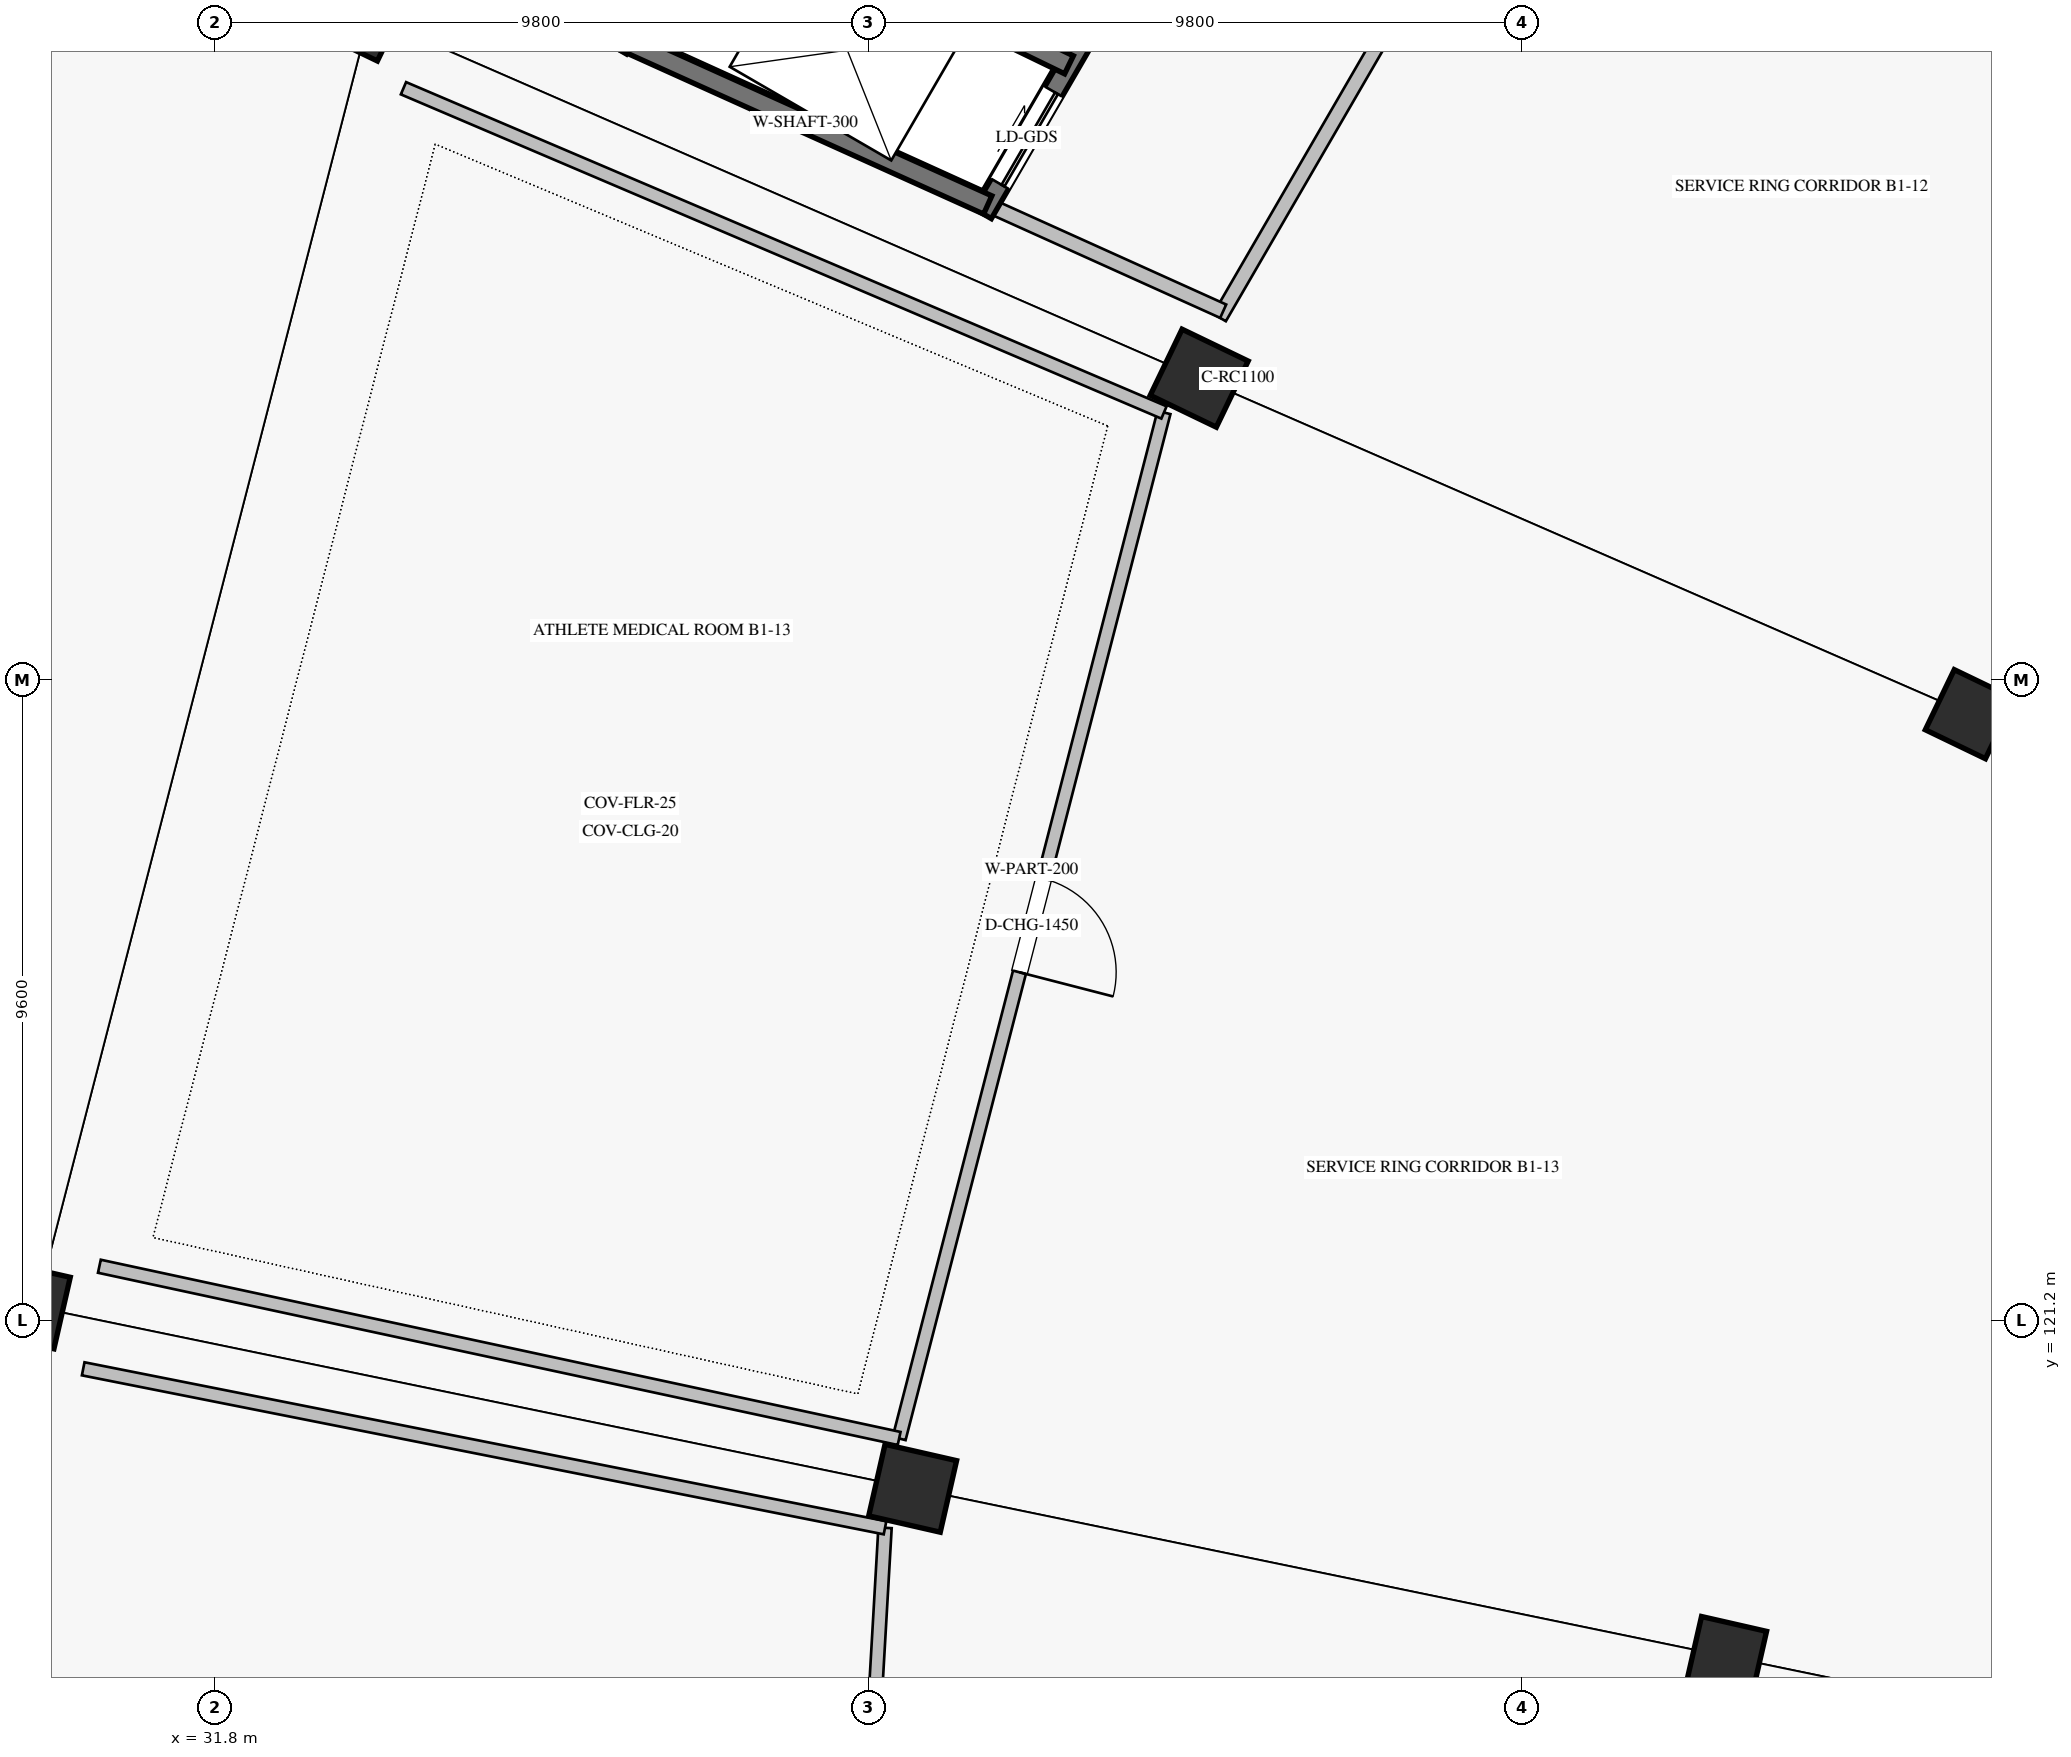
"""IFC4 building model, lengths in metres.
Left out: names, types, materials, properties, quantities, classifications, styles, units other than length and angle.
Written with IfcOpenShell. Run it as: python <this file> out.ifc"""

import sys

from ifc_helpers import new_model, si_unit, direction, frame, frame_2d, origin, origin_2d, place, context, subcontext, project, spatial, rectangle, extrude, element, fill, save


model = new_model("IFC4")
c1 = context("Model", 3, precision=1e-05, world=origin(), true_north=direction((0.0, 1.0)))
c2 = subcontext(c1, "Body", "Model", "MODEL_VIEW")
j1 = project(units=[si_unit("LENGTHUNIT", "METRE"), si_unit("PLANEANGLEUNIT", "RADIAN")], contexts=[c1])
p1 = place(None, origin())
s1 = spatial("IfcSite", under=j1, at=p1, CompositionType="ELEMENT")
p2 = place(p1, origin())
s2 = spatial("IfcBuilding", under=s1, at=p2, CompositionType="ELEMENT")
p3 = place(p2, frame((0.0, 0.0, -5.44)))
s3 = spatial("IfcBuildingStorey", under=s2, at=p3, CompositionType="ELEMENT", Elevation=-5.44)
for number, where, z_axis, x_axis in (
    (1, (58.114, 130.287, 0.0), (0.0, 0.0, 1.0), (-0.901, 0.434, 0.0)),
    (2, (54.467, 116.16, 0.0), (0.0, 0.0, 1.0), (-0.975, 0.223, 0.0)),
):
    element("IfcColumn", number, at=place(p3, frame(where, z_axis=z_axis, x_axis=x_axis)), inside=s3, PredefinedType="COLUMN", context=c2, shape_type="SweptSolid", body=[
        extrude(rectangle(XDim=1.0, YDim=1.0, at=origin_2d()), origin(), (0.0, 0.0, 1.0), 5.44),
    ])
for number, where, z_axis, x_axis in (
    (3, (46.559, 135.325, 0.0), (0.0, 0.0, 1.0), (-0.901, 0.434, 0.0)),
    (4, (42.262, 118.682, 0.0), (0.0, 0.0, 1.0), (-0.975, 0.223, 0.0)),
):
    element("IfcColumn", number, at=place(p3, frame(where, z_axis=z_axis, x_axis=x_axis)), inside=s3, PredefinedType="COLUMN", context=c2, shape_type="SweptSolid", body=[
        extrude(rectangle(XDim=1.1, YDim=1.1, at=origin_2d()), origin(), (0.0, 0.0, 1.0), 5.44),
    ])
for number, where, z_axis, x_axis in (
    (5, (34.115, 140.75, 0.0), (0.0, 0.0, 1.0), (-0.901, 0.434, 0.0)),
    (6, (29.119, 121.398, 0.0), (0.0, 0.0, 1.0), (-0.975, 0.223, 0.0)),
):
    element("IfcColumn", number, at=place(p3, frame(where, z_axis=z_axis, x_axis=x_axis)), inside=s3, PredefinedType="COLUMN", context=c2, shape_type="SweptSolid", body=[
        extrude(rectangle(XDim=0.8, YDim=1.1, at=origin_2d()), origin(), (0.0, 0.0, 1.0), 5.44),
    ])
p4 = place(p3, frame((45.9, 142.254, 0.0), z_axis=(0.0, 0.0, 1.0), x_axis=(-0.501629534056, -0.86508254552, 0.0)))
e7 = element("IfcWall", 7, at=p4, inside=s3, PredefinedType="SHEAR", context=c2, shape_type="SweptSolid", body=[
    extrude(rectangle(XDim=5.157, YDim=0.3, at=frame_2d((2.579, 0.0))), origin(), (0.0, 0.0, 1.0), 5.14),
])
p5 = place(p4, frame((0.766, 0.0, 0.0)))
e8 = element("IfcOpeningElement", 8, at=p5, cuts=e7, PredefinedType="OPENING", context=c2, shape_type="SweptSolid", body=[
    extrude(rectangle(XDim=1.1, YDim=2.2, at=frame_2d((0.55, 1.1))), frame((0.0, 0.16, 0.0), z_axis=(0.0, -1.0, 0.0), x_axis=(1.0, 0.0, 0.0)), (0.0, 0.0, 1.0), 0.32),
])
p6 = place(p4, frame((3.042, 0.0, 0.0)))
e9 = element("IfcOpeningElement", 9, at=p6, cuts=e7, PredefinedType="OPENING", context=c2, shape_type="SweptSolid", body=[
    extrude(rectangle(XDim=1.6, YDim=2.3, at=frame_2d((0.8, 1.15))), frame((0.0, 0.16, 0.0), z_axis=(0.0, -1.0, 0.0), x_axis=(1.0, 0.0, 0.0)), (0.0, 0.0, 1.0), 0.32),
])
p7 = place(p3, frame((40.595, 145.012, 0.0), z_axis=(0.0, 0.0, 1.0), x_axis=(-0.501630260479, -0.865082124293, 0.0)))
e10 = element("IfcWall", 10, at=p7, inside=s3, PredefinedType="SHEAR", context=c2, shape_type="SweptSolid", body=[
    extrude(rectangle(XDim=5.491, YDim=0.3, at=frame_2d((2.746, 0.0))), origin(), (0.0, 0.0, 1.0), 5.14),
])
p8 = place(p3, frame((43.388, 137.922, 0.0), z_axis=(0.0, 0.0, 1.0), x_axis=(-0.911521602376, 0.41125219562, 0.0)))
e11 = element("IfcWall", 11, at=p8, inside=s3, PredefinedType="SHEAR", context=c2, shape_type="SweptSolid", body=[
    extrude(rectangle(XDim=6.004, YDim=0.3, at=frame_2d((3.002, 0.0))), origin(), (0.0, 0.0, 1.0), 5.14),
])
p9 = place(p3, frame((44.606, 140.023, 0.0), z_axis=(0.0, 0.0, 1.0), x_axis=(-0.899759302591, 0.436386522936, 0.0)))
e12 = element("IfcWall", 12, at=p9, inside=s3, PredefinedType="SHEAR", context=c2, shape_type="SweptSolid", body=[
    extrude(rectangle(XDim=5.989, YDim=0.3, at=frame_2d((2.995, 0.0))), origin(), (0.0, 0.0, 1.0), 5.14),
])
p10 = place(p3, frame((54.944, 150.17, 0.0), z_axis=(0.0, 0.0, 1.0), x_axis=(-0.501612626242, -0.865092349518, 0.0)))
e13 = element("IfcWall", 13, at=p10, inside=s3, PredefinedType="SOLIDWALL", context=c2, shape_type="SweptSolid", body=[
    extrude(rectangle(XDim=16.11, YDim=0.22, at=frame_2d((8.055, 0.0))), origin(), (0.0, 0.0, 1.0), 4.088),
])
p11 = place(p10, frame((6.511, 0.0, 0.0)))
e14 = element("IfcOpeningElement", 14, at=p11, cuts=e13, PredefinedType="OPENING", context=c2, shape_type="SweptSolid", body=[
    extrude(rectangle(XDim=1.5, YDim=2.2, at=frame_2d((0.75, 1.1))), frame((0.0, 0.12, 0.0), z_axis=(0.0, -1.0, 0.0), x_axis=(1.0, 0.0, 0.0)), (0.0, 0.0, 1.0), 0.24),
])
p12 = place(p3, frame((46.918, 136.329, 0.0), z_axis=(0.0, 0.0, 1.0), x_axis=(-0.91149641055, 0.411308027582, 0.0)))
e15 = element("IfcWall", 15, at=p12, inside=s3, PredefinedType="SOLIDWALL", context=c2, shape_type="SweptSolid", body=[
    extrude(rectangle(XDim=3.873, YDim=0.22, at=frame_2d((1.937, 0.0))), origin(), (0.0, 0.0, 1.0), 5.14),
])
p13 = place(p3, frame((46.031, 134.811, 0.0), z_axis=(0.0, 0.0, 1.0), x_axis=(-0.249970043824, -0.968253570709, 0.0)))
e16 = element("IfcWall", 16, at=p13, inside=s3, PredefinedType="PARTITIONING", context=c2, shape_type="SweptSolid", body=[
    extrude(rectangle(XDim=15.887, YDim=0.2, at=frame_2d((7.943, 0.0))), origin(), (0.0, 0.0, 1.0), 4.46),
])
p14 = place(p13, frame((7.218, 0.0, 0.0)))
e17 = element("IfcOpeningElement", 17, at=p14, cuts=e16, PredefinedType="OPENING", context=c2, shape_type="SweptSolid", body=[
    extrude(rectangle(XDim=1.45, YDim=2.2, at=frame_2d((0.725, 1.1))), frame((0.0, 0.11, 0.0), z_axis=(0.0, -1.0, 0.0), x_axis=(1.0, 0.0, 0.0)), (0.0, 0.0, 1.0), 0.22),
])
p15 = place(p3, frame((46.031, 134.811, 0.0), z_axis=(0.0, 0.0, 1.0), x_axis=(-0.919905328402, 0.392140519173, 0.0)))
e18 = element("IfcWall", 18, at=p15, inside=s3, PredefinedType="PARTITIONING", context=c2, shape_type="SweptSolid", body=[
    extrude(rectangle(XDim=12.396, YDim=0.2, at=frame_2d((6.198, 0.0))), origin(), (0.0, 0.0, 1.0), 4.46),
])
p16 = place(p3, frame((42.06, 119.428, 0.0), z_axis=(0.0, 0.0, 1.0), x_axis=(-0.97759337709, 0.210502230558, 0.0)))
e19 = element("IfcWall", 19, at=p16, inside=s3, PredefinedType="PARTITIONING", context=c2, shape_type="SweptSolid", body=[
    extrude(rectangle(XDim=12.266, YDim=0.2, at=frame_2d((6.133, 0.0))), origin(), (0.0, 0.0, 1.0), 4.46),
])
p17 = place(p3, frame((41.848, 118.089, 0.0), z_axis=(0.0, 0.0, 1.0), x_axis=(-0.057603503798, -0.998339539611, 0.0)))
e20 = element("IfcWall", 20, at=p17, inside=s3, PredefinedType="PARTITIONING", context=c2, shape_type="SweptSolid", body=[
    extrude(rectangle(XDim=15.444, YDim=0.2, at=frame_2d((7.722, 0.0))), origin(), (0.0, 0.0, 1.0), 4.46),
])
p18 = place(p17, frame((7.232, 0.0, 0.0)))
e21 = element("IfcOpeningElement", 21, at=p18, cuts=e20, PredefinedType="OPENING", context=c2, shape_type="SweptSolid", body=[
    extrude(rectangle(XDim=0.98, YDim=2.15, at=frame_2d((0.49, 1.075))), frame((0.0, 0.11, 0.0), z_axis=(0.0, -1.0, 0.0), x_axis=(1.0, 0.0, 0.0)), (0.0, 0.0, 1.0), 0.22),
])
p19 = place(p3, frame((41.848, 118.089, 0.0), z_axis=(0.0, 0.0, 1.0), x_axis=(-0.980904167784, 0.194491680088, 0.0)))
e22 = element("IfcWall", 22, at=p19, inside=s3, PredefinedType="PARTITIONING", context=c2, shape_type="SweptSolid", body=[
    extrude(rectangle(XDim=12.257, YDim=0.2, at=frame_2d((6.128, 0.0))), origin(), (0.0, 0.0, 1.0), 4.46),
])
p20 = place(p6, origin())
e23 = element("IfcDoor", 23, at=p20, inside=s3, OperationType="SLIDING_TO_LEFT", PredefinedType="DOOR", context=c2, shape_type="SweptSolid", body=[
    extrude(rectangle(XDim=1.6, YDim=2.3, at=frame_2d((0.8, 1.15))), frame((0.0, 0.025, 0.0), z_axis=(0.0, -1.0, 0.0), x_axis=(1.0, 0.0, 0.0)), (0.0, 0.0, 1.0), 0.05),
])
fill(e9, e23)
p21 = place(p14, origin())
e24 = element("IfcDoor", 24, at=p21, inside=s3, OperationType="SINGLE_SWING_RIGHT", PredefinedType="DOOR", context=c2, shape_type="SweptSolid", body=[
    extrude(rectangle(XDim=1.45, YDim=2.2, at=frame_2d((0.725, 1.1))), frame((0.0, 0.025, 0.0), z_axis=(0.0, -1.0, 0.0), x_axis=(1.0, 0.0, 0.0)), (0.0, 0.0, 1.0), 0.05),
])
fill(e17, e24)
save(model, sys.argv[1])
